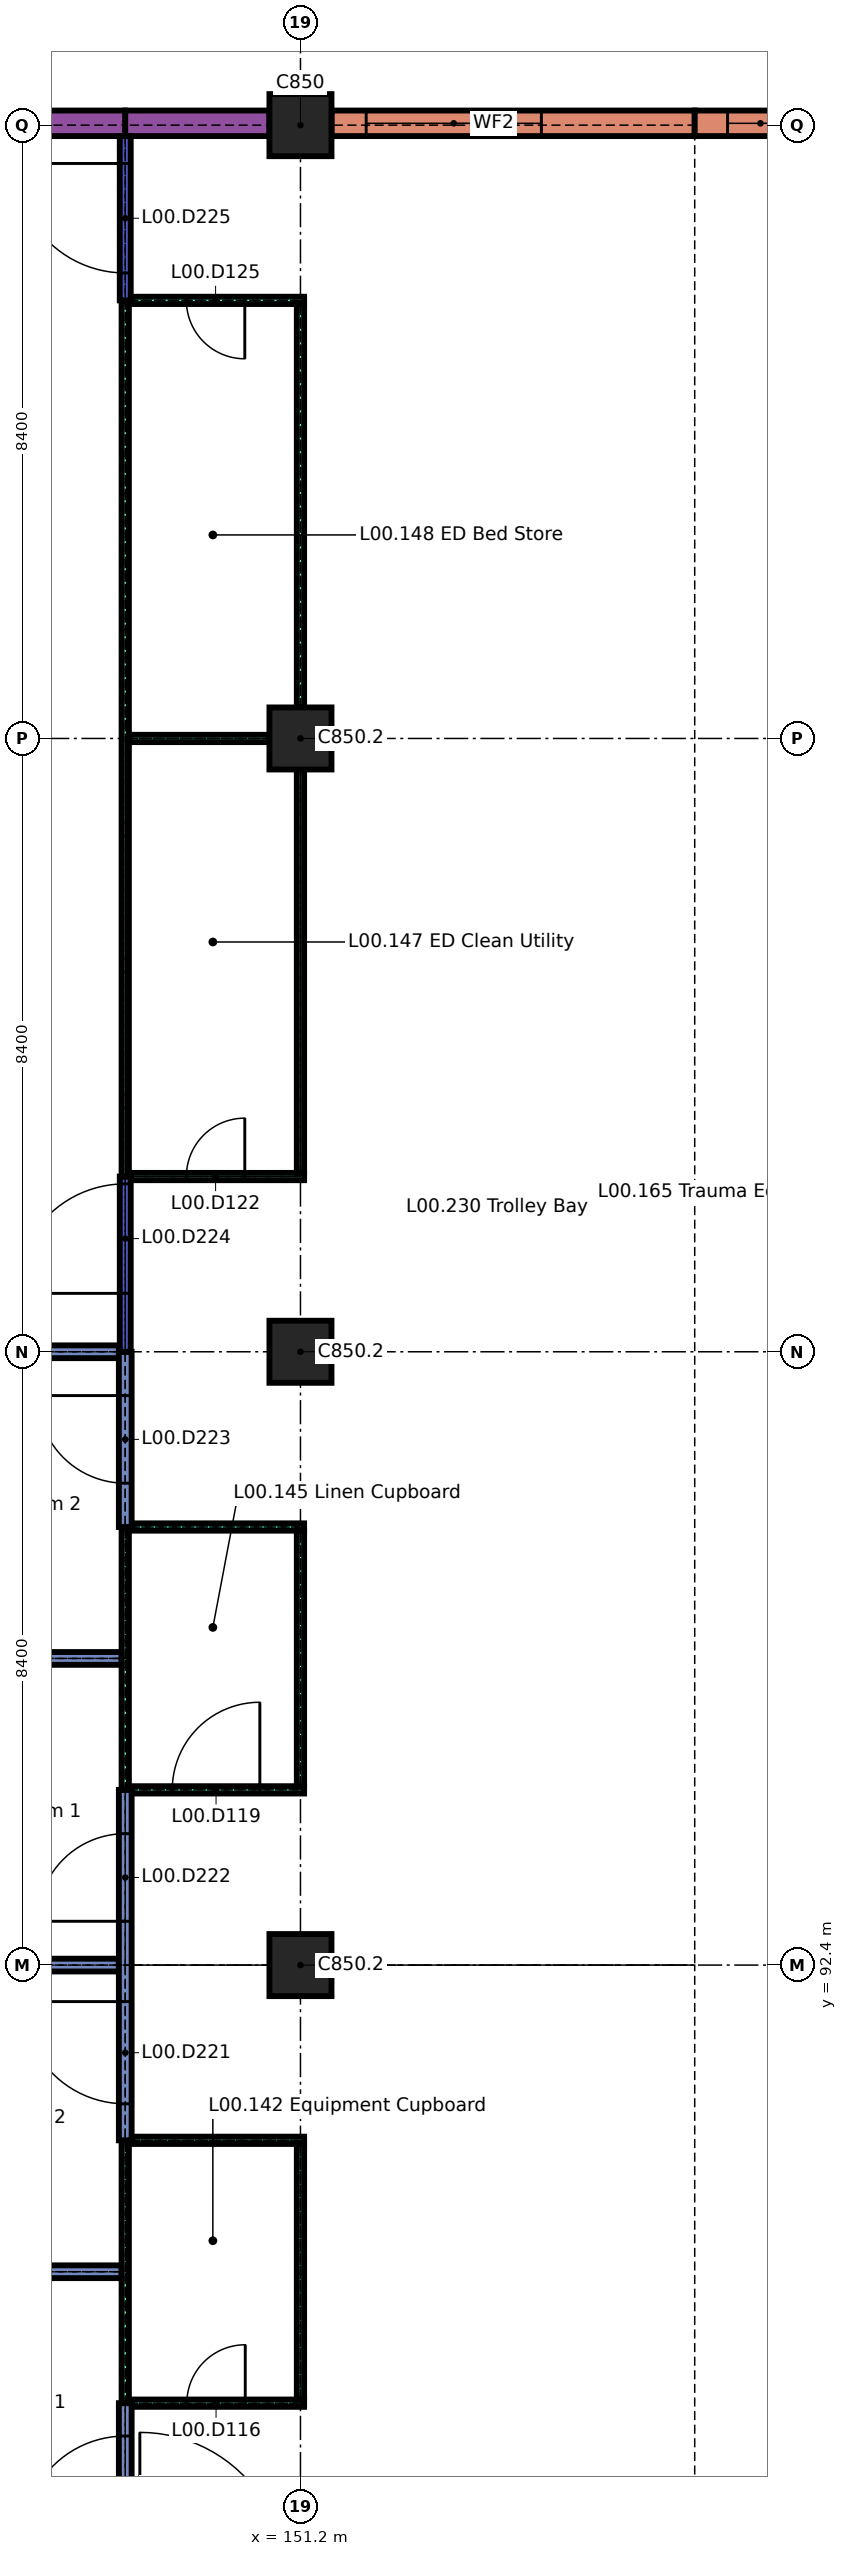
"""IFC4 building model, lengths in metres.
Left out: names, types, materials, properties, quantities, classifications, styles, units other than length and angle.
Written with IfcOpenShell. Run it as: python <this file> out.ifc"""

import sys

from ifc_helpers import new_model, si_unit, direction, frame, frame_2d, origin, origin_2d, place, context, subcontext, project, spatial, rectangle, extrude, element, fill, save


model = new_model("IFC4")
c1 = context("Model", 3, precision=1e-05, world=origin(), true_north=direction((0.0, 1.0)))
c2 = subcontext(c1, "Body", "Model", "MODEL_VIEW")
j1 = project(units=[si_unit("LENGTHUNIT", "METRE"), si_unit("PLANEANGLEUNIT", "RADIAN")], contexts=[c1])
p1 = place(None, origin())
s1 = spatial("IfcSite", under=j1, at=p1, CompositionType="ELEMENT")
p2 = place(p1, origin())
s2 = spatial("IfcBuilding", under=s1, at=p2, CompositionType="ELEMENT")
p3 = place(p2, origin())
s3 = spatial("IfcBuildingStorey", under=s2, at=p3, CompositionType="ELEMENT", Elevation=0.0)
for number, where, z_axis, x_axis in (
    (1, (151.2, 92.4, 0.0), (0.0, 0.0, 1.0), (1.0, 0.0, 0.0)),
    (2, (151.2, 100.8, 0.0), (0.0, 0.0, 1.0), (1.0, 0.0, 0.0)),
    (3, (151.2, 109.2, 0.0), (0.0, 0.0, 1.0), (1.0, 0.0, 0.0)),
    (4, (151.2, 117.6, 0.0), (0.0, 0.0, 1.0), (1.0, 0.0, 0.0)),
):
    element("IfcColumn", number, at=place(p3, frame(where, z_axis=z_axis, x_axis=x_axis)), inside=s3, PredefinedType="COLUMN", context=c2, shape_type="SweptSolid", body=[
        extrude(rectangle(XDim=0.85, YDim=0.85, at=origin_2d()), origin(), (0.0, 0.0, 1.0), 4.14),
    ])
p4 = place(p3, frame((143.225, 117.625, 0.0), z_axis=(0.0, 0.0, 1.0), x_axis=(1.0, 0.0, 0.0)))
e5 = element("IfcWall", 5, at=p4, inside=s3, PredefinedType="SOLIDWALL", context=c2, shape_type="SweptSolid", body=[
    extrude(rectangle(XDim=5.575, YDim=0.35, at=frame_2d((2.788, 0.0))), origin(), (0.0, 0.0, 1.0), 3.84),
])
p5 = place(p4, frame((0.775, 0.0, 0.9)))
e6 = element("IfcOpeningElement", 6, at=p5, cuts=e5, PredefinedType="OPENING", context=c2, shape_type="SweptSolid", body=[
    extrude(rectangle(XDim=1.8, YDim=2.1, at=frame_2d((0.9, 1.05))), frame((0.0, 0.185, 0.0), z_axis=(0.0, -1.0, 0.0), x_axis=(1.0, 0.0, 0.0)), (0.0, 0.0, 1.0), 0.37),
])
p6 = place(p3, frame((148.8, 117.625, 0.0), z_axis=(0.0, 0.0, 1.0), x_axis=(1.0, 0.0, 0.0)))
e7 = element("IfcWall", 7, at=p6, inside=s3, PredefinedType="SOLIDWALL", context=c2, shape_type="SweptSolid", body=[
    extrude(rectangle(XDim=1.975, YDim=0.35, at=frame_2d((0.987, 0.0))), origin(), (0.0, 0.0, 1.0), 3.84),
])
p7 = place(p3, frame((151.625, 117.625, 0.0), z_axis=(0.0, 0.0, 1.0), x_axis=(1.0, 0.0, 0.0)))
e8 = element("IfcWall", 8, at=p7, inside=s3, PredefinedType="SOLIDWALL", context=c2, shape_type="SweptSolid", body=[
    extrude(rectangle(XDim=4.975, YDim=0.35, at=frame_2d((2.488, 0.0))), origin(), (0.0, 0.0, 1.0), 4.14),
])
p8 = place(p7, frame((0.475, 0.0, 0.9)))
e9 = element("IfcOpeningElement", 9, at=p8, cuts=e8, PredefinedType="OPENING", context=c2, shape_type="SweptSolid", body=[
    extrude(rectangle(XDim=2.4, YDim=2.1, at=frame_2d((1.2, 1.05))), frame((0.0, 0.185, 0.0), z_axis=(0.0, -1.0, 0.0), x_axis=(1.0, 0.0, 0.0)), (0.0, 0.0, 1.0), 0.37),
])
p9 = place(p3, frame((156.6, 117.625, 0.0), z_axis=(0.0, 0.0, 1.0), x_axis=(1.0, 0.0, 0.0)))
e10 = element("IfcWall", 10, at=p9, inside=s3, PredefinedType="SOLIDWALL", context=c2, shape_type="SweptSolid", body=[
    extrude(rectangle(XDim=3.0, YDim=0.35, at=frame_2d((1.5, 0.0))), origin(), (0.0, 0.0, 1.0), 4.14),
])
p10 = place(p9, frame((0.45, 0.0, 0.9)))
e11 = element("IfcOpeningElement", 11, at=p10, cuts=e10, PredefinedType="OPENING", context=c2, shape_type="SweptSolid", body=[
    extrude(rectangle(XDim=0.9, YDim=2.1, at=frame_2d((0.45, 1.05))), frame((0.0, 0.185, 0.0), z_axis=(0.0, -1.0, 0.0), x_axis=(1.0, 0.0, 0.0)), (0.0, 0.0, 1.0), 0.37),
])
p11 = place(p3, frame((148.887, 86.4, 0.0), z_axis=(0.0, 0.0, 1.0), x_axis=(1.0, 0.0, 0.0)))
e12 = element("IfcWall", 12, at=p11, inside=s3, PredefinedType="PARTITIONING", context=c2, shape_type="SweptSolid", body=[
    extrude(rectangle(XDim=2.363, YDim=0.1, at=frame_2d((1.181, 0.0))), origin(), (0.0, 0.0, 1.0), 4.14),
])
p12 = place(p11, frame((0.756, 0.0, 0.0)))
e13 = element("IfcOpeningElement", 13, at=p12, cuts=e12, PredefinedType="OPENING", context=c2, shape_type="SweptSolid", body=[
    extrude(rectangle(XDim=0.8, YDim=2.1, at=frame_2d((0.4, 1.05))), frame((0.0, 0.06, 0.0), z_axis=(0.0, -1.0, 0.0), x_axis=(1.0, 0.0, 0.0)), (0.0, 0.0, 1.0), 0.12),
])
p13 = place(p3, frame((142.95, 88.2, 0.0), z_axis=(0.0, 0.0, 1.0), x_axis=(1.0, 0.0, 0.0)))
e14 = element("IfcWall", 14, at=p13, inside=s3, PredefinedType="PARTITIONING", context=c2, shape_type="SweptSolid", body=[
    extrude(rectangle(XDim=5.8, YDim=0.175, at=frame_2d((2.9, 0.0))), origin(), (0.0, 0.0, 1.0), 4.14),
])
p14 = place(p3, frame((148.887, 90.0, 0.0), z_axis=(0.0, 0.0, 1.0), x_axis=(1.0, 0.0, 0.0)))
e15 = element("IfcWall", 15, at=p14, inside=s3, PredefinedType="PARTITIONING", context=c2, shape_type="SweptSolid", body=[
    extrude(rectangle(XDim=2.363, YDim=0.1, at=frame_2d((1.181, 0.0))), origin(), (0.0, 0.0, 1.0), 4.14),
])
p15 = place(p3, frame((143.225, 92.4, 0.0), z_axis=(0.0, 0.0, 1.0), x_axis=(1.0, 0.0, 0.0)))
e16 = element("IfcWall", 16, at=p15, inside=s3, PredefinedType="PARTITIONING", context=c2, shape_type="SweptSolid", body=[
    extrude(rectangle(XDim=5.487, YDim=0.175, at=frame_2d((2.744, 0.0))), origin(), (0.0, 0.0, 1.0), 4.14),
])
p16 = place(p3, frame((148.887, 94.8, 0.0), z_axis=(0.0, 0.0, 1.0), x_axis=(1.0, 0.0, 0.0)))
e17 = element("IfcWall", 17, at=p16, inside=s3, PredefinedType="PARTITIONING", context=c2, shape_type="SweptSolid", body=[
    extrude(rectangle(XDim=2.363, YDim=0.1, at=frame_2d((1.181, 0.0))), origin(), (0.0, 0.0, 1.0), 4.14),
])
p17 = place(p16, frame((0.556, 0.0, 0.0)))
e18 = element("IfcOpeningElement", 18, at=p17, cuts=e17, PredefinedType="OPENING", context=c2, shape_type="SweptSolid", body=[
    extrude(rectangle(XDim=1.2, YDim=2.1, at=frame_2d((0.6, 1.05))), frame((0.0, 0.06, 0.0), z_axis=(0.0, -1.0, 0.0), x_axis=(1.0, 0.0, 0.0)), (0.0, 0.0, 1.0), 0.12),
])
p18 = place(p3, frame((142.95, 96.6, 0.0), z_axis=(0.0, 0.0, 1.0), x_axis=(1.0, 0.0, 0.0)))
e19 = element("IfcWall", 19, at=p18, inside=s3, PredefinedType="PARTITIONING", context=c2, shape_type="SweptSolid", body=[
    extrude(rectangle(XDim=5.8, YDim=0.175, at=frame_2d((2.9, 0.0))), origin(), (0.0, 0.0, 1.0), 4.14),
])
p19 = place(p3, frame((148.887, 98.4, 0.0), z_axis=(0.0, 0.0, 1.0), x_axis=(1.0, 0.0, 0.0)))
e20 = element("IfcWall", 20, at=p19, inside=s3, PredefinedType="PARTITIONING", context=c2, shape_type="SweptSolid", body=[
    extrude(rectangle(XDim=2.363, YDim=0.1, at=frame_2d((1.181, 0.0))), origin(), (0.0, 0.0, 1.0), 4.14),
])
p20 = place(p3, frame((143.225, 100.8, 0.0), z_axis=(0.0, 0.0, 1.0), x_axis=(1.0, 0.0, 0.0)))
e21 = element("IfcWall", 21, at=p20, inside=s3, PredefinedType="PARTITIONING", context=c2, shape_type="SweptSolid", body=[
    extrude(rectangle(XDim=5.487, YDim=0.175, at=frame_2d((2.744, 0.0))), origin(), (0.0, 0.0, 1.0), 4.14),
])
p21 = place(p3, frame((148.875, 103.2, 0.0), z_axis=(0.0, 0.0, 1.0), x_axis=(1.0, 0.0, 0.0)))
e22 = element("IfcWall", 22, at=p21, inside=s3, PredefinedType="PARTITIONING", context=c2, shape_type="SweptSolid", body=[
    extrude(rectangle(XDim=2.375, YDim=0.1, at=frame_2d((1.188, 0.0))), origin(), (0.0, 0.0, 1.0), 4.14),
])
p22 = place(p21, frame((0.762, 0.0, 0.0)))
e23 = element("IfcOpeningElement", 23, at=p22, cuts=e22, PredefinedType="OPENING", context=c2, shape_type="SweptSolid", body=[
    extrude(rectangle(XDim=0.8, YDim=2.1, at=frame_2d((0.4, 1.05))), frame((0.0, 0.06, 0.0), z_axis=(0.0, -1.0, 0.0), x_axis=(1.0, 0.0, 0.0)), (0.0, 0.0, 1.0), 0.12),
])
p23 = place(p3, frame((148.85, 109.2, 0.0), z_axis=(0.0, 0.0, 1.0), x_axis=(1.0, 0.0, 0.0)))
e24 = element("IfcWall", 24, at=p23, inside=s3, PredefinedType="PARTITIONING", context=c2, shape_type="SweptSolid", body=[
    extrude(rectangle(XDim=1.925, YDim=0.1, at=frame_2d((0.962, 0.0))), origin(), (0.0, 0.0, 1.0), 4.14),
])
p24 = place(p3, frame((148.875, 115.2, 0.0), z_axis=(0.0, 0.0, 1.0), x_axis=(1.0, 0.0, 0.0)))
e25 = element("IfcWall", 25, at=p24, inside=s3, PredefinedType="PARTITIONING", context=c2, shape_type="SweptSolid", body=[
    extrude(rectangle(XDim=2.375, YDim=0.1, at=frame_2d((1.188, 0.0))), origin(), (0.0, 0.0, 1.0), 4.14),
])
p25 = place(p24, frame((0.762, 0.0, 0.0)))
e26 = element("IfcOpeningElement", 26, at=p25, cuts=e25, PredefinedType="OPENING", context=c2, shape_type="SweptSolid", body=[
    extrude(rectangle(XDim=0.8, YDim=2.1, at=frame_2d((0.4, 1.05))), frame((0.0, 0.06, 0.0), z_axis=(0.0, -1.0, 0.0), x_axis=(1.0, 0.0, 0.0)), (0.0, 0.0, 1.0), 0.12),
])
p26 = place(p3, frame((148.8, 84.1, 0.0), z_axis=(0.0, 0.0, 1.0), x_axis=(0.0, 1.0, 0.0)))
e27 = element("IfcWall", 27, at=p26, inside=s3, PredefinedType="PARTITIONING", context=c2, shape_type="SweptSolid", body=[
    extrude(rectangle(XDim=2.3, YDim=0.175, at=frame_2d((1.15, 0.0))), origin(), (0.0, 0.0, 1.0), 4.14),
])
p27 = place(p26, frame((0.45, 0.0, 0.0)))
e28 = element("IfcOpeningElement", 28, at=p27, cuts=e27, PredefinedType="OPENING", context=c2, shape_type="SweptSolid", body=[
    extrude(rectangle(XDim=1.4, YDim=2.1, at=frame_2d((0.7, 1.05))), frame((0.0, 0.097, 0.0), z_axis=(0.0, -1.0, 0.0), x_axis=(1.0, 0.0, 0.0)), (0.0, 0.0, 1.0), 0.195),
])
p28 = place(p3, frame((148.8, 86.4, 0.0), z_axis=(0.0, 0.0, 1.0), x_axis=(0.0, 1.0, 0.0)))
e29 = element("IfcWall", 29, at=p28, inside=s3, PredefinedType="PARTITIONING", context=c2, shape_type="SweptSolid", body=[
    extrude(rectangle(XDim=3.6, YDim=0.1, at=frame_2d((1.8, 0.0))), origin(), (0.0, 0.0, 1.0), 4.14),
])
p29 = place(p3, frame((148.8, 90.0, 0.0), z_axis=(0.0, 0.0, 1.0), x_axis=(0.0, 1.0, 0.0)))
e30 = element("IfcWall", 30, at=p29, inside=s3, PredefinedType="PARTITIONING", context=c2, shape_type="SweptSolid", body=[
    extrude(rectangle(XDim=4.8, YDim=0.175, at=frame_2d((2.4, 0.0))), origin(), (0.0, 0.0, 1.0), 4.14),
])
p30 = place(p29, frame((0.5, 0.0, 0.0)))
e31 = element("IfcOpeningElement", 31, at=p30, cuts=e30, PredefinedType="OPENING", context=c2, shape_type="SweptSolid", body=[
    extrude(rectangle(XDim=1.4, YDim=2.1, at=frame_2d((0.7, 1.05))), frame((0.0, 0.097, 0.0), z_axis=(0.0, -1.0, 0.0), x_axis=(1.0, 0.0, 0.0)), (0.0, 0.0, 1.0), 0.195),
])
p31 = place(p29, frame((3.0, 0.0, 0.0)))
e32 = element("IfcOpeningElement", 32, at=p31, cuts=e30, PredefinedType="OPENING", context=c2, shape_type="SweptSolid", body=[
    extrude(rectangle(XDim=1.2, YDim=2.1, at=frame_2d((0.6, 1.05))), frame((0.0, 0.097, 0.0), z_axis=(0.0, -1.0, 0.0), x_axis=(1.0, 0.0, 0.0)), (0.0, 0.0, 1.0), 0.195),
])
p32 = place(p3, frame((148.8, 94.8, 0.0), z_axis=(0.0, 0.0, 1.0), x_axis=(0.0, 1.0, 0.0)))
e33 = element("IfcWall", 33, at=p32, inside=s3, PredefinedType="PARTITIONING", context=c2, shape_type="SweptSolid", body=[
    extrude(rectangle(XDim=3.6, YDim=0.1, at=frame_2d((1.8, 0.0))), origin(), (0.0, 0.0, 1.0), 4.14),
])
p33 = place(p3, frame((148.8, 98.4, 0.0), z_axis=(0.0, 0.0, 1.0), x_axis=(0.0, 1.0, 0.0)))
e34 = element("IfcWall", 34, at=p33, inside=s3, PredefinedType="PARTITIONING", context=c2, shape_type="SweptSolid", body=[
    extrude(rectangle(XDim=2.4, YDim=0.175, at=frame_2d((1.2, 0.0))), origin(), (0.0, 0.0, 1.0), 4.14),
])
p34 = place(p33, frame((0.6, 0.0, 0.0)))
e35 = element("IfcOpeningElement", 35, at=p34, cuts=e34, PredefinedType="OPENING", context=c2, shape_type="SweptSolid", body=[
    extrude(rectangle(XDim=1.2, YDim=2.1, at=frame_2d((0.6, 1.05))), frame((0.0, 0.097, 0.0), z_axis=(0.0, -1.0, 0.0), x_axis=(1.0, 0.0, 0.0)), (0.0, 0.0, 1.0), 0.195),
])
p35 = place(p3, frame((148.8, 100.8, 0.0), z_axis=(0.0, 0.0, 1.0), x_axis=(0.0, 1.0, 0.0)))
e36 = element("IfcWall", 36, at=p35, inside=s3, PredefinedType="PARTITIONING", context=c2, shape_type="SweptSolid", body=[
    extrude(rectangle(XDim=2.4, YDim=0.15, at=frame_2d((1.2, 0.0))), origin(), (0.0, 0.0, 1.0), 4.14),
])
p36 = place(p35, frame((0.8, 0.0, 0.0)))
e37 = element("IfcOpeningElement", 37, at=p36, cuts=e36, PredefinedType="OPENING", context=c2, shape_type="SweptSolid", body=[
    extrude(rectangle(XDim=1.5, YDim=2.4, at=frame_2d((0.75, 1.2))), frame((0.0, 0.085, 0.0), z_axis=(0.0, -1.0, 0.0), x_axis=(1.0, 0.0, 0.0)), (0.0, 0.0, 1.0), 0.17),
])
p37 = place(p3, frame((148.8, 103.2, 0.0), z_axis=(0.0, 0.0, 1.0), x_axis=(0.0, 1.0, 0.0)))
e38 = element("IfcWall", 38, at=p37, inside=s3, PredefinedType="PARTITIONING", context=c2, shape_type="SweptSolid", body=[
    extrude(rectangle(XDim=12.0, YDim=0.1, at=frame_2d((6.0, 0.0))), origin(), (0.0, 0.0, 1.0), 4.14),
])
p38 = place(p3, frame((148.8, 115.2, 0.0), z_axis=(0.0, 0.0, 1.0), x_axis=(0.0, 1.0, 0.0)))
e39 = element("IfcWall", 39, at=p38, inside=s3, PredefinedType="PARTITIONING", context=c2, shape_type="SweptSolid", body=[
    extrude(rectangle(XDim=2.25, YDim=0.15, at=frame_2d((1.125, 0.0))), origin(), (0.0, 0.0, 1.0), 4.14),
])
p39 = place(p38, frame((0.375, 0.0, 0.0)))
e40 = element("IfcOpeningElement", 40, at=p39, cuts=e39, PredefinedType="OPENING", context=c2, shape_type="SweptSolid", body=[
    extrude(rectangle(XDim=1.5, YDim=2.4, at=frame_2d((0.75, 1.2))), frame((0.0, 0.085, 0.0), z_axis=(0.0, -1.0, 0.0), x_axis=(1.0, 0.0, 0.0)), (0.0, 0.0, 1.0), 0.17),
])
for number, where, z_axis, x_axis in (
    (41, (151.2, 86.45, 0.0), (0.0, 0.0, 1.0), (0.0, 1.0, 0.0)),
    (42, (151.2, 94.85, 0.0), (0.0, 0.0, 1.0), (0.0, 1.0, 0.0)),
):
    element("IfcWall", number, at=place(p3, frame(where, z_axis=z_axis, x_axis=x_axis)), inside=s3, PredefinedType="PARTITIONING", context=c2, shape_type="SweptSolid", body=[
        extrude(rectangle(XDim=3.5, YDim=0.1, at=frame_2d((1.75, 0.0))), origin(), (0.0, 0.0, 1.0), 4.14),
    ])
for number, where, z_axis, x_axis in (
    (43, (151.2, 103.25, 0.0), (0.0, 0.0, 1.0), (0.0, 1.0, 0.0)),
    (44, (151.2, 109.625, 0.0), (0.0, 0.0, 1.0), (0.0, 1.0, 0.0)),
):
    element("IfcWall", number, at=place(p3, frame(where, z_axis=z_axis, x_axis=x_axis)), inside=s3, PredefinedType="PARTITIONING", context=c2, shape_type="SweptSolid", body=[
        extrude(rectangle(XDim=5.525, YDim=0.1, at=frame_2d((2.762, 0.0))), origin(), (0.0, 0.0, 1.0), 4.14),
    ])
p40 = place(p8, origin())
e45 = element("IfcWindow", 45, at=p40, inside=s3, PartitioningType="DOUBLE_PANEL_VERTICAL", PredefinedType="WINDOW", context=c2, shape_type="SweptSolid", body=[
    extrude(rectangle(XDim=2.4, YDim=2.1, at=frame_2d((1.2, 1.05))), frame((0.0, 0.03, 0.0), z_axis=(0.0, -1.0, 0.0), x_axis=(1.0, 0.0, 0.0)), (0.0, 0.0, 1.0), 0.06),
])
fill(e9, e45)
p41 = place(p10, origin())
e46 = element("IfcWindow", 46, at=p41, inside=s3, PartitioningType="SINGLE_PANEL", PredefinedType="WINDOW", context=c2, shape_type="SweptSolid", body=[
    extrude(rectangle(XDim=0.9, YDim=2.1, at=frame_2d((0.45, 1.05))), frame((0.0, 0.03, 0.0), z_axis=(0.0, -1.0, 0.0), x_axis=(1.0, 0.0, 0.0)), (0.0, 0.0, 1.0), 0.06),
])
fill(e11, e46)
p42 = place(p12, origin())
e47 = element("IfcDoor", 47, at=p42, inside=s3, OperationType="SINGLE_SWING_LEFT", PredefinedType="DOOR", context=c2, shape_type="SweptSolid", body=[
    extrude(rectangle(XDim=0.8, YDim=2.1, at=frame_2d((0.4, 1.05))), frame((0.0, 0.02, 0.0), z_axis=(0.0, -1.0, 0.0), x_axis=(1.0, 0.0, 0.0)), (0.0, 0.0, 1.0), 0.04),
])
fill(e13, e47)
p43 = place(p17, origin())
e48 = element("IfcDoor", 48, at=p43, inside=s3, OperationType="SINGLE_SWING_LEFT", PredefinedType="DOOR", context=c2, shape_type="SweptSolid", body=[
    extrude(rectangle(XDim=1.2, YDim=2.1, at=frame_2d((0.6, 1.05))), frame((0.0, 0.02, 0.0), z_axis=(0.0, -1.0, 0.0), x_axis=(1.0, 0.0, 0.0)), (0.0, 0.0, 1.0), 0.04),
])
fill(e18, e48)
p44 = place(p22, origin())
e49 = element("IfcDoor", 49, at=p44, inside=s3, OperationType="SINGLE_SWING_LEFT", PredefinedType="DOOR", context=c2, shape_type="SweptSolid", body=[
    extrude(rectangle(XDim=0.8, YDim=2.1, at=frame_2d((0.4, 1.05))), frame((0.0, 0.02, 0.0), z_axis=(0.0, -1.0, 0.0), x_axis=(1.0, 0.0, 0.0)), (0.0, 0.0, 1.0), 0.04),
])
fill(e23, e49)
p45 = place(p25, origin())
e50 = element("IfcDoor", 50, at=p45, inside=s3, OperationType="SINGLE_SWING_RIGHT", PredefinedType="DOOR", context=c2, shape_type="SweptSolid", body=[
    extrude(rectangle(XDim=0.8, YDim=2.1, at=frame_2d((0.4, 1.05))), frame((0.0, 0.02, 0.0), z_axis=(0.0, -1.0, 0.0), x_axis=(1.0, 0.0, 0.0)), (0.0, 0.0, 1.0), 0.04),
])
fill(e26, e50)
p46 = place(p27, origin())
e51 = element("IfcDoor", 51, at=p46, inside=s3, OperationType="SINGLE_SWING_RIGHT", PredefinedType="DOOR", context=c2, shape_type="SweptSolid", body=[
    extrude(rectangle(XDim=1.4, YDim=2.1, at=frame_2d((0.7, 1.05))), frame((0.0, 0.025, 0.0), z_axis=(0.0, -1.0, 0.0), x_axis=(1.0, 0.0, 0.0)), (0.0, 0.0, 1.0), 0.05),
])
fill(e28, e51)
p47 = place(p30, origin())
e52 = element("IfcDoor", 52, at=p47, inside=s3, OperationType="SINGLE_SWING_LEFT", PredefinedType="DOOR", context=c2, shape_type="SweptSolid", body=[
    extrude(rectangle(XDim=1.4, YDim=2.1, at=frame_2d((0.7, 1.05))), frame((0.0, 0.025, 0.0), z_axis=(0.0, -1.0, 0.0), x_axis=(1.0, 0.0, 0.0)), (0.0, 0.0, 1.0), 0.05),
])
fill(e31, e52)
p48 = place(p31, origin())
e53 = element("IfcDoor", 53, at=p48, inside=s3, OperationType="SINGLE_SWING_RIGHT", PredefinedType="DOOR", context=c2, shape_type="SweptSolid", body=[
    extrude(rectangle(XDim=1.2, YDim=2.1, at=frame_2d((0.6, 1.05))), frame((0.0, 0.035, 0.0), z_axis=(0.0, -1.0, 0.0), x_axis=(1.0, 0.0, 0.0)), (0.0, 0.0, 1.0), 0.07),
])
fill(e32, e53)
p49 = place(p34, origin())
e54 = element("IfcDoor", 54, at=p49, inside=s3, OperationType="SINGLE_SWING_LEFT", PredefinedType="DOOR", context=c2, shape_type="SweptSolid", body=[
    extrude(rectangle(XDim=1.2, YDim=2.1, at=frame_2d((0.6, 1.05))), frame((0.0, 0.035, 0.0), z_axis=(0.0, -1.0, 0.0), x_axis=(1.0, 0.0, 0.0)), (0.0, 0.0, 1.0), 0.07),
])
fill(e35, e54)
p50 = place(p36, origin())
e55 = element("IfcDoor", 55, at=p50, inside=s3, OperationType="SINGLE_SWING_RIGHT", PredefinedType="DOOR", context=c2, shape_type="SweptSolid", body=[
    extrude(rectangle(XDim=1.5, YDim=2.4, at=frame_2d((0.75, 1.2))), frame((0.0, 0.03, 0.0), z_axis=(0.0, -1.0, 0.0), x_axis=(1.0, 0.0, 0.0)), (0.0, 0.0, 1.0), 0.06),
])
fill(e37, e55)
p51 = place(p39, origin())
e56 = element("IfcDoor", 56, at=p51, inside=s3, OperationType="SINGLE_SWING_LEFT", PredefinedType="DOOR", context=c2, shape_type="SweptSolid", body=[
    extrude(rectangle(XDim=1.5, YDim=2.4, at=frame_2d((0.75, 1.2))), frame((0.0, 0.03, 0.0), z_axis=(0.0, -1.0, 0.0), x_axis=(1.0, 0.0, 0.0)), (0.0, 0.0, 1.0), 0.06),
])
fill(e40, e56)
save(model, sys.argv[1])
